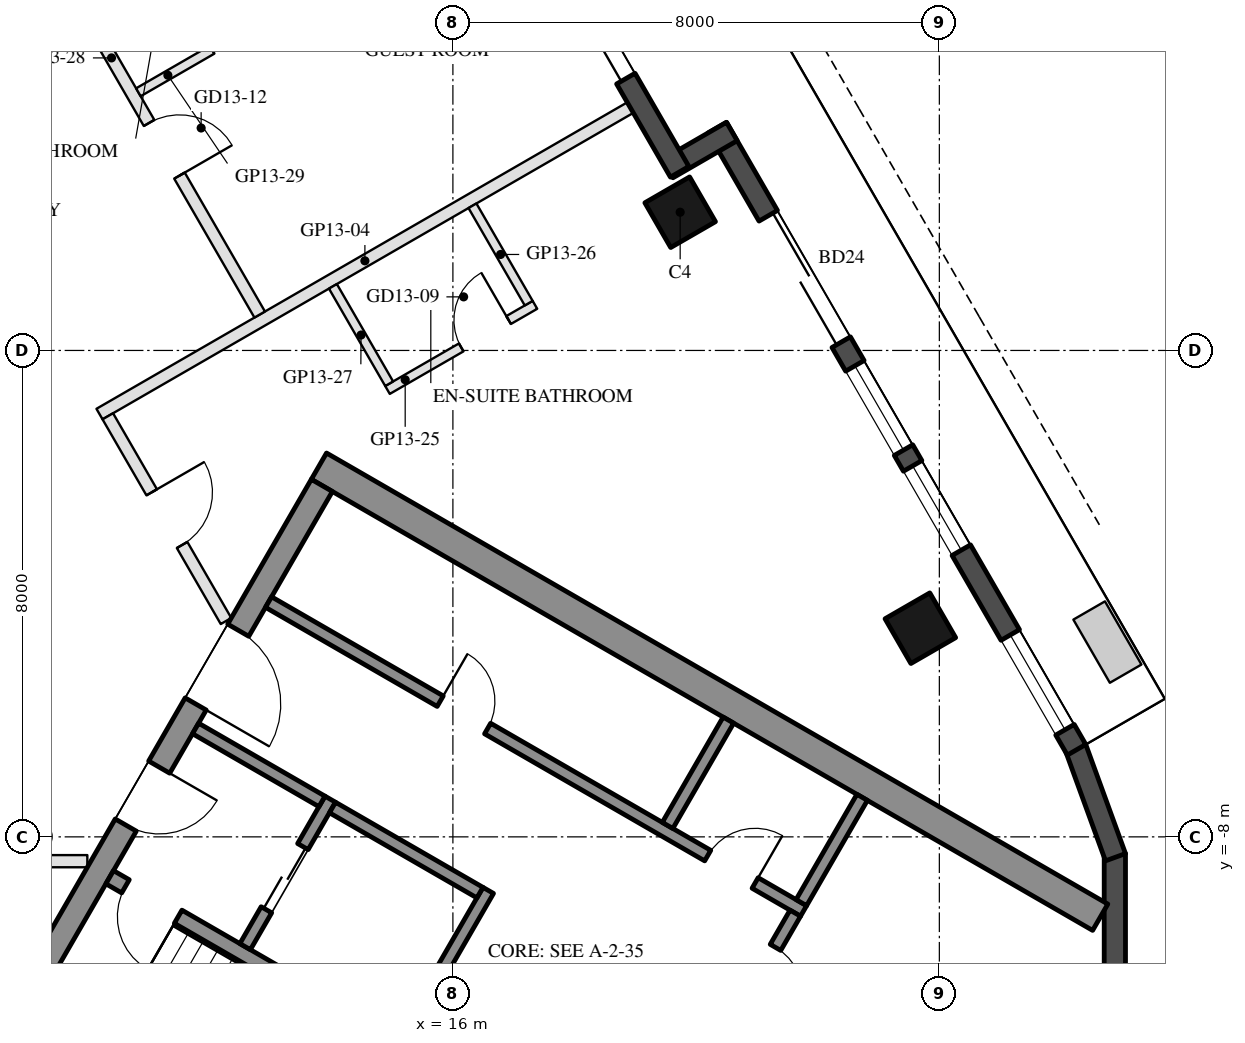
"""IFC4 building model, lengths in metres.
Left out: names, types, materials, properties, quantities, classifications, styles, units other than length and angle.
Written with IfcOpenShell. Run it as: python <this file> out.ifc"""

import sys

from ifc_helpers import new_model, si_unit, direction, frame, frame_2d, origin, origin_2d, place, context, subcontext, project, spatial, rectangle, hollow_rectangle, extrude, element, fill, save


model = new_model("IFC4")
c1 = context("Model", 3, precision=1e-05, world=origin(), true_north=direction((0.0, 1.0)))
c2 = subcontext(c1, "Body", "Model", "MODEL_VIEW")
j1 = project(units=[si_unit("LENGTHUNIT", "METRE"), si_unit("PLANEANGLEUNIT", "RADIAN")], contexts=[c1])
p1 = place(None, origin())
s1 = spatial("IfcSite", under=j1, at=p1, CompositionType="ELEMENT")
p2 = place(p1, origin())
s2 = spatial("IfcBuilding", under=s1, at=p2, CompositionType="ELEMENT")
p3 = place(p2, frame((0.0, 0.0, 154.0)))
s3 = spatial("IfcBuildingStorey", under=s2, at=p3, CompositionType="ELEMENT", Elevation=154.0)
for number, where, z_axis, x_axis in (
    (1, (23.688, -4.568, 0.0), (0.0, 0.0, 1.0), (-0.5, 0.866, 0.0)),
    (2, (19.738, 2.273, 0.0), (0.0, 0.0, 1.0), (-0.5, 0.866, 0.0)),
):
    element("IfcColumn", number, at=place(p3, frame(where, z_axis=z_axis, x_axis=x_axis)), inside=s3, PredefinedType="COLUMN", context=c2, shape_type="SweptSolid", body=[
        extrude(hollow_rectangle(XDim=0.85, YDim=0.85, WallThickness=0.04, at=origin_2d()), origin(), (0.0, 0.0, 1.0), 3.7),
    ])
for number, where, z_axis, x_axis in (
    (3, (26.244, -11.92, 0.0), (0.0, 0.0, 1.0), (0.342, 0.94, 0.0)),
    (4, (26.886, -10.185, 0.0), (0.0, 0.0, 1.0), (0.0, 1.0, 0.0)),
    (5, (26.897, -8.335, 0.0), (0.0, 0.0, 1.0), (-0.342, 0.94, 0.0)),
):
    element("IfcWall", number, at=place(p3, frame(where, z_axis=z_axis, x_axis=x_axis)), inside=s3, PredefinedType="SOLIDWALL", context=c2, shape_type="SweptSolid", body=[
        extrude(rectangle(XDim=1.91, YDim=0.35, at=frame_2d((0.955, 0.0))), origin(), (0.0, 0.0, 1.0), 3.55),
    ])
p4 = place(p3, frame((26.257, -6.567, 0.0), z_axis=(0.0, 0.0, 1.0), x_axis=(-0.500023526245, 0.866011820475, 0.0)))
e6 = element("IfcWall", 6, at=p4, inside=s3, PredefinedType="SOLIDWALL", context=c2, shape_type="SweptSolid", body=[
    extrude(rectangle(XDim=11.816, YDim=0.35, at=frame_2d((5.908, 0.0))), origin(), (0.0, 0.0, 1.0), 3.55),
])
p5 = place(p4, frame((0.38, 0.0, 0.3)))
e7 = element("IfcOpeningElement", 7, at=p5, cuts=e6, PredefinedType="OPENING", context=c2, shape_type="SweptSolid", body=[
    extrude(rectangle(XDim=1.8, YDim=2.65, at=frame_2d((0.9, 1.325))), frame((0.0, 0.185, 0.0), z_axis=(0.0, -1.0, 0.0), x_axis=(1.0, 0.0, 0.0)), (0.0, 0.0, 1.0), 0.37),
])
p6 = place(p4, frame((7.741, 0.0, 0.0)))
e8 = element("IfcOpeningElement", 8, at=p6, cuts=e6, PredefinedType="OPENING", context=c2, shape_type="SweptSolid", body=[
    extrude(rectangle(XDim=2.4, YDim=2.4, at=frame_2d((1.2, 1.2))), frame((0.0, 0.185, 0.0), z_axis=(0.0, -1.0, 0.0), x_axis=(1.0, 0.0, 0.0)), (0.0, 0.0, 1.0), 0.37),
])
p7 = place(p4, frame((3.791, 0.0, 0.3)))
e9 = element("IfcOpeningElement", 9, at=p7, cuts=e6, PredefinedType="OPENING", context=c2, shape_type="SweptSolid", body=[
    extrude(rectangle(XDim=1.6, YDim=2.65, at=frame_2d((0.8, 1.325))), frame((0.0, 0.185, 0.0), z_axis=(0.0, -1.0, 0.0), x_axis=(1.0, 0.0, 0.0)), (0.0, 0.0, 1.0), 0.37),
])
p8 = place(p4, frame((5.691, 0.0, 0.3)))
e10 = element("IfcOpeningElement", 10, at=p8, cuts=e6, PredefinedType="OPENING", context=c2, shape_type="SweptSolid", body=[
    extrude(rectangle(XDim=1.6, YDim=2.65, at=frame_2d((0.8, 1.325))), frame((0.0, 0.185, 0.0), z_axis=(0.0, -1.0, 0.0), x_axis=(1.0, 0.0, 0.0)), (0.0, 0.0, 1.0), 0.37),
])
p9 = place(p3, frame((20.588, 3.601, 0.0), z_axis=(0.0, 0.0, 1.0), x_axis=(-0.866005645448, -0.500034220881, 0.0)))
e11 = element("IfcWall", 11, at=p9, inside=s3, PredefinedType="SOLIDWALL", context=c2, shape_type="SweptSolid", body=[
    extrude(rectangle(XDim=1.22, YDim=0.35, at=frame_2d((0.61, 0.0))), origin(), (0.0, 0.0, 1.0), 3.55),
])
p10 = place(p3, frame((19.729, 2.938, 0.0), z_axis=(0.0, 0.0, 1.0), x_axis=(-0.499976430342, 0.866039011305, 0.0)))
e12 = element("IfcWall", 12, at=p10, inside=s3, PredefinedType="SOLIDWALL", context=c2, shape_type="SweptSolid", body=[
    extrude(rectangle(XDim=6.74, YDim=0.35, at=frame_2d((3.37, 0.0))), origin(), (0.0, 0.0, 1.0), 3.55),
])
p11 = place(p10, frame((1.77, 0.0, 0.0)))
e13 = element("IfcOpeningElement", 13, at=p11, cuts=e12, PredefinedType="OPENING", context=c2, shape_type="SweptSolid", body=[
    extrude(rectangle(XDim=2.4, YDim=2.4, at=frame_2d((1.2, 1.2))), frame((0.0, 0.185, 0.0), z_axis=(0.0, -1.0, 0.0), x_axis=(1.0, 0.0, 0.0)), (0.0, 0.0, 1.0), 0.37),
])
p12 = place(p10, frame((4.47, 0.0, 0.3)))
e14 = element("IfcOpeningElement", 14, at=p12, cuts=e12, PredefinedType="OPENING", context=c2, shape_type="SweptSolid", body=[
    extrude(rectangle(XDim=1.5, YDim=2.65, at=frame_2d((0.75, 1.325))), frame((0.0, 0.185, 0.0), z_axis=(0.0, -1.0, 0.0), x_axis=(1.0, 0.0, 0.0)), (0.0, 0.0, 1.0), 0.37),
])
p13 = place(p3, frame((13.797, -1.903, 0.0), z_axis=(0.0, 0.0, 1.0), x_axis=(0.866025009528, -0.500000682871, 0.0)))
e15 = element("IfcWall", 15, at=p13, inside=s3, PredefinedType="SHEAR", context=c2, shape_type="SweptSolid", body=[
    extrude(rectangle(XDim=14.837, YDim=0.5, at=frame_2d((7.418, 0.0))), origin(), (0.0, 0.0, 1.0), 3.5),
])
p14 = place(p3, frame((8.845, -10.88, 0.0), z_axis=(0.0, 0.0, 1.0), x_axis=(0.500004234368, 0.866022959057, 0.0)))
e16 = element("IfcWall", 16, at=p14, inside=s3, PredefinedType="SHEAR", context=c2, shape_type="SweptSolid", body=[
    extrude(rectangle(XDim=10.0, YDim=0.4, at=frame_2d((5.0, 0.0))), origin(), (0.0, 0.0, 1.0), 3.5),
])
p15 = place(p14, frame((3.55, 0.0, 0.0)))
e17 = element("IfcOpeningElement", 17, at=p15, cuts=e16, PredefinedType="OPENING", context=c2, shape_type="SweptSolid", body=[
    extrude(rectangle(XDim=1.1, YDim=2.1, at=frame_2d((0.55, 1.05))), frame((0.0, 0.21, 0.0), z_axis=(0.0, -1.0, 0.0), x_axis=(1.0, 0.0, 0.0)), (0.0, 0.0, 1.0), 0.42),
])
p16 = place(p14, frame((5.85, 0.0, 0.0)))
e18 = element("IfcOpeningElement", 18, at=p16, cuts=e16, PredefinedType="OPENING", context=c2, shape_type="SweptSolid", body=[
    extrude(rectangle(XDim=1.4, YDim=2.1, at=frame_2d((0.7, 1.05))), frame((0.0, 0.21, 0.0), z_axis=(0.0, -1.0, 0.0), x_axis=(1.0, 0.0, 0.0)), (0.0, 0.0, 1.0), 0.42),
])
p17 = place(p3, frame((10.356, -8.664, 0.0), z_axis=(0.0, 0.0, 1.0), x_axis=(0.866028629588, -0.499994412703, 0.0)))
e19 = element("IfcWall", 19, at=p17, inside=s3, PredefinedType="SHEAR", context=c2, shape_type="SweptSolid", body=[
    extrude(rectangle(XDim=6.45, YDim=0.25, at=frame_2d((3.225, 0.0))), origin(), (0.0, 0.0, 1.0), 3.5),
])
p18 = place(p17, frame((0.3, 0.0, 0.0)))
e20 = element("IfcOpeningElement", 20, at=p18, cuts=e19, PredefinedType="OPENING", context=c2, shape_type="SweptSolid", body=[
    extrude(rectangle(XDim=1.0, YDim=2.1, at=frame_2d((0.5, 1.05))), frame((0.0, 0.135, 0.0), z_axis=(0.0, -1.0, 0.0), x_axis=(1.0, 0.0, 0.0)), (0.0, 0.0, 1.0), 0.27),
])
p19 = place(p3, frame((15.181, -11.305, 0.0), z_axis=(0.0, 0.0, 1.0), x_axis=(0.49994636267, 0.866056369097, 0.0)))
e21 = element("IfcWall", 21, at=p19, inside=s3, PredefinedType="SHEAR", context=c2, shape_type="SweptSolid", body=[
    extrude(rectangle(XDim=2.8, YDim=0.2, at=frame_2d((1.4, 0.0))), origin(), (0.0, 0.0, 1.0), 3.5),
])
p20 = place(p3, frame((12.583, -9.805, 0.0), z_axis=(0.0, 0.0, 1.0), x_axis=(0.49994636267, 0.866056369097, 0.0)))
e22 = element("IfcWall", 22, at=p20, inside=s3, PredefinedType="SHEAR", context=c2, shape_type="SweptSolid", body=[
    extrude(rectangle(XDim=2.8, YDim=0.2, at=frame_2d((1.4, 0.0))), origin(), (0.0, 0.0, 1.0), 3.5),
])
p21 = place(p20, frame((0.7, 0.0, 0.0)))
e23 = element("IfcOpeningElement", 23, at=p21, cuts=e22, PredefinedType="OPENING", context=c2, shape_type="SweptSolid", body=[
    extrude(rectangle(XDim=1.2, YDim=2.1, at=frame_2d((0.6, 1.05))), frame((0.0, 0.11, 0.0), z_axis=(0.0, -1.0, 0.0), x_axis=(1.0, 0.0, 0.0)), (0.0, 0.0, 1.0), 0.22),
])
p22 = place(p3, frame((11.768, -6.217, 0.0), z_axis=(0.0, 0.0, 1.0), x_axis=(0.866050077142, -0.499957262057, 0.0)))
e24 = element("IfcWall", 24, at=p22, inside=s3, PredefinedType="SHEAR", context=c2, shape_type="SweptSolid", body=[
    extrude(rectangle(XDim=2.4, YDim=0.2, at=frame_2d((1.2, 0.0))), origin(), (0.0, 0.0, 1.0), 3.5),
])
p23 = place(p3, frame((14.02, -7.517, 0.0), z_axis=(0.0, 0.0, 1.0), x_axis=(0.866034573852, -0.49998411664, 0.0)))
e25 = element("IfcWall", 25, at=p23, inside=s3, PredefinedType="SHEAR", context=c2, shape_type="SweptSolid", body=[
    extrude(rectangle(XDim=2.8, YDim=0.2, at=frame_2d((1.4, 0.0))), origin(), (0.0, 0.0, 1.0), 3.5),
])
p24 = place(p3, frame((12.968, -4.138, 0.0), z_axis=(0.0, 0.0, 1.0), x_axis=(0.866028328073, -0.49999493495, 0.0)))
e26 = element("IfcWall", 26, at=p24, inside=s3, PredefinedType="SHEAR", context=c2, shape_type="SweptSolid", body=[
    extrude(rectangle(XDim=10.16, YDim=0.2, at=frame_2d((5.08, 0.0))), origin(), (0.0, 0.0, 1.0), 3.5),
])
p25 = place(p24, frame((3.26, 0.0, 0.0)))
e27 = element("IfcOpeningElement", 27, at=p25, cuts=e26, PredefinedType="OPENING", context=c2, shape_type="SweptSolid", body=[
    extrude(rectangle(XDim=0.9, YDim=2.1, at=frame_2d((0.45, 1.05))), frame((0.0, 0.11, 0.0), z_axis=(0.0, -1.0, 0.0), x_axis=(1.0, 0.0, 0.0)), (0.0, 0.0, 1.0), 0.22),
])
p26 = place(p24, frame((8.34, 0.0, 0.0)))
e28 = element("IfcOpeningElement", 28, at=p26, cuts=e26, PredefinedType="OPENING", context=c2, shape_type="SweptSolid", body=[
    extrude(rectangle(XDim=0.9, YDim=2.1, at=frame_2d((0.45, 1.05))), frame((0.0, 0.11, 0.0), z_axis=(0.0, -1.0, 0.0), x_axis=(1.0, 0.0, 0.0)), (0.0, 0.0, 1.0), 0.22),
])
p27 = place(p3, frame((20.43, -11.333, 0.0), z_axis=(0.0, 0.0, 1.0), x_axis=(0.500001309137, 0.866024647952, 0.0)))
e29 = element("IfcWall", 29, at=p27, inside=s3, PredefinedType="SHEAR", context=c2, shape_type="SweptSolid", body=[
    extrude(rectangle(XDim=2.4, YDim=0.2, at=frame_2d((1.2, 0.0))), origin(), (0.0, 0.0, 1.0), 3.5),
])
p28 = place(p27, frame((0.85, 0.0, 0.0)))
e30 = element("IfcOpeningElement", 30, at=p28, cuts=e29, PredefinedType="OPENING", context=c2, shape_type="SweptSolid", body=[
    extrude(rectangle(XDim=0.9, YDim=2.1, at=frame_2d((0.45, 1.05))), frame((0.0, 0.11, 0.0), z_axis=(0.0, -1.0, 0.0), x_axis=(1.0, 0.0, 0.0)), (0.0, 0.0, 1.0), 0.22),
])
for number, where, z_axis, x_axis in (
    (31, (19.531, -7.812, 0.0), (0.0, 0.0, 1.0), (0.5, 0.866, 0.0)),
    (32, (21.73, -9.082, 0.0), (0.0, 0.0, 1.0), (0.5, 0.866, 0.0)),
):
    element("IfcWall", number, at=place(p3, frame(where, z_axis=z_axis, x_axis=x_axis)), inside=s3, PredefinedType="SHEAR", context=c2, shape_type="SweptSolid", body=[
        extrude(rectangle(XDim=2.0, YDim=0.2, at=frame_2d((1.0, 0.0))), origin(), (0.0, 0.0, 1.0), 3.5),
    ])
p29 = place(p3, frame((18.917, 3.994, 0.0), z_axis=(0.0, 0.0, 1.0), x_axis=(-0.866022637375, -0.500004791531, 0.0)))
e33 = element("IfcWall", 33, at=p29, inside=s3, PredefinedType="PARTITIONING", context=c2, shape_type="SweptSolid", body=[
    extrude(rectangle(XDim=10.08, YDim=0.2, at=frame_2d((5.04, 0.0))), origin(), (0.0, 0.0, 1.0), 3.06),
])
p30 = place(p3, frame((9.988, -8.4, 0.0), z_axis=(0.0, 0.0, 1.0), x_axis=(-1.0, 0.0, 0.0)))
e34 = element("IfcWall", 34, at=p30, inside=s3, PredefinedType="PARTITIONING", context=c2, shape_type="SweptSolid", body=[
    extrude(rectangle(XDim=5.686, YDim=0.2, at=frame_2d((2.843, 0.0))), origin(), (0.0, 0.0, 1.0), 2.95),
])
p31 = place(p30, frame((2.343, 0.0, 0.0)))
e35 = element("IfcOpeningElement", 35, at=p31, cuts=e34, PredefinedType="OPENING", context=c2, shape_type="SweptSolid", body=[
    extrude(rectangle(XDim=1.0, YDim=2.1, at=frame_2d((0.5, 1.05))), frame((0.0, 0.11, 0.0), z_axis=(0.0, -1.0, 0.0), x_axis=(1.0, 0.0, 0.0)), (0.0, 0.0, 1.0), 0.22),
])
p32 = place(p3, frame((10.325, -1.083, 0.0), z_axis=(0.0, 0.0, 1.0), x_axis=(0.500008716408, -0.866020371305, 0.0)))
e36 = element("IfcWall", 36, at=p32, inside=s3, PredefinedType="PARTITIONING", context=c2, shape_type="SweptSolid", body=[
    extrude(rectangle(XDim=3.888, YDim=0.2, at=frame_2d((1.944, 0.0))), origin(), (0.0, 0.0, 1.0), 2.95),
])
p33 = place(p32, frame((1.444, 0.0, 0.0)))
e37 = element("IfcOpeningElement", 37, at=p33, cuts=e36, PredefinedType="OPENING", context=c2, shape_type="SweptSolid", body=[
    extrude(rectangle(XDim=1.0, YDim=2.1, at=frame_2d((0.5, 1.05))), frame((0.0, 0.11, 0.0), z_axis=(0.0, -1.0, 0.0), x_axis=(1.0, 0.0, 0.0)), (0.0, 0.0, 1.0), 0.22),
])
p34 = place(p3, frame((14.924, -0.65, 0.0), z_axis=(0.0, 0.0, 1.0), x_axis=(0.866056369097, 0.49994636267, 0.0)))
e38 = element("IfcWall", 38, at=p34, inside=s3, PredefinedType="PARTITIONING", context=c2, shape_type="SweptSolid", body=[
    extrude(rectangle(XDim=2.8, YDim=0.15, at=frame_2d((1.4, 0.0))), origin(), (0.0, 0.0, 1.0), 2.95),
])
p35 = place(p34, frame((1.4, 0.0, 0.0)))
e39 = element("IfcOpeningElement", 39, at=p35, cuts=e38, PredefinedType="OPENING", context=c2, shape_type="SweptSolid", body=[
    extrude(rectangle(XDim=0.9, YDim=2.1, at=frame_2d((0.45, 1.05))), frame((0.0, 0.085, 0.0), z_axis=(0.0, -1.0, 0.0), x_axis=(1.0, 0.0, 0.0)), (0.0, 0.0, 1.0), 0.17),
])
for number, where, z_axis, x_axis in (
    (40, (17.247, 0.778, 0.0), (0.0, 0.0, 1.0), (-0.5, 0.866, 0.0)),
    (41, (14.952, -0.547, 0.0), (0.0, 0.0, 1.0), (-0.5, 0.866, 0.0)),
):
    element("IfcWall", number, at=place(p3, frame(where, z_axis=z_axis, x_axis=x_axis)), inside=s3, PredefinedType="PARTITIONING", context=c2, shape_type="SweptSolid", body=[
        extrude(rectangle(XDim=1.85, YDim=0.15, at=frame_2d((0.925, 0.0))), origin(), (0.0, 0.0, 1.0), 2.95),
    ])
p36 = place(p3, frame((9.777, 5.867, 0.0), z_axis=(0.0, 0.0, 1.0), x_axis=(0.499996493545, -0.866027428228, 0.0)))
e42 = element("IfcWall", 42, at=p36, inside=s3, PredefinedType="PARTITIONING", context=c2, shape_type="SweptSolid", body=[
    extrude(rectangle(XDim=6.092, YDim=0.2, at=frame_2d((3.046, 0.0))), origin(), (0.0, 0.0, 1.0), 2.95),
])
p37 = place(p36, frame((2.454, 0.0, 0.0)))
e43 = element("IfcOpeningElement", 43, at=p37, cuts=e42, PredefinedType="OPENING", context=c2, shape_type="SweptSolid", body=[
    extrude(rectangle(XDim=1.0, YDim=2.1, at=frame_2d((0.5, 1.05))), frame((0.0, 0.11, 0.0), z_axis=(0.0, -1.0, 0.0), x_axis=(1.0, 0.0, 0.0)), (0.0, 0.0, 1.0), 0.22),
])
p38 = place(p3, frame((10.827, 4.246, 0.0), z_axis=(0.0, 0.0, 1.0), x_axis=(0.866018616679, 0.500011755427, 0.0)))
e44 = element("IfcWall", 44, at=p38, inside=s3, PredefinedType="PARTITIONING", context=c2, shape_type="SweptSolid", body=[
    extrude(rectangle(XDim=2.8, YDim=0.15, at=frame_2d((1.4, 0.0))), origin(), (0.0, 0.0, 1.0), 3.55),
])
p39 = place(p38, frame((1.4, 0.0, 0.0)))
e45 = element("IfcOpeningElement", 45, at=p39, cuts=e44, PredefinedType="OPENING", context=c2, shape_type="SweptSolid", body=[
    extrude(rectangle(XDim=0.9, YDim=2.1, at=frame_2d((0.45, 1.05))), frame((0.0, 0.085, 0.0), z_axis=(0.0, -1.0, 0.0), x_axis=(1.0, 0.0, 0.0)), (0.0, 0.0, 1.0), 0.17),
])
p40 = place(p5, origin())
e46 = element("IfcWindow", 46, at=p40, inside=s3, PartitioningType="SINGLE_PANEL", PredefinedType="WINDOW", context=c2, shape_type="SweptSolid", body=[
    extrude(rectangle(XDim=1.8, YDim=2.65, at=frame_2d((0.9, 1.325))), frame((0.0, 0.03, 0.0), z_axis=(0.0, -1.0, 0.0), x_axis=(1.0, 0.0, 0.0)), (0.0, 0.0, 1.0), 0.06),
])
fill(e7, e46)
p41 = place(p6, frame((2.4, 0.0, 0.0), z_axis=(0.0, 0.0, 1.0), x_axis=(-1.0, 0.0, 0.0)))
e47 = element("IfcDoor", 47, at=p41, inside=s3, OperationType="SLIDING_TO_LEFT", PredefinedType="DOOR", context=c2, shape_type="SweptSolid", body=[
    extrude(rectangle(XDim=2.4, YDim=2.4, at=frame_2d((1.2, 1.2))), frame((0.0, 0.025, 0.0), z_axis=(0.0, -1.0, 0.0), x_axis=(1.0, 0.0, 0.0)), (0.0, 0.0, 1.0), 0.05),
])
fill(e8, e47)
p42 = place(p7, origin())
e48 = element("IfcWindow", 48, at=p42, inside=s3, PartitioningType="SINGLE_PANEL", PredefinedType="WINDOW", context=c2, shape_type="SweptSolid", body=[
    extrude(rectangle(XDim=1.6, YDim=2.65, at=frame_2d((0.8, 1.325))), frame((0.0, 0.03, 0.0), z_axis=(0.0, -1.0, 0.0), x_axis=(1.0, 0.0, 0.0)), (0.0, 0.0, 1.0), 0.06),
])
fill(e9, e48)
p43 = place(p8, origin())
e49 = element("IfcWindow", 49, at=p43, inside=s3, PartitioningType="SINGLE_PANEL", PredefinedType="WINDOW", context=c2, shape_type="SweptSolid", body=[
    extrude(rectangle(XDim=1.6, YDim=2.65, at=frame_2d((0.8, 1.325))), frame((0.0, 0.03, 0.0), z_axis=(0.0, -1.0, 0.0), x_axis=(1.0, 0.0, 0.0)), (0.0, 0.0, 1.0), 0.06),
])
fill(e10, e49)
p44 = place(p11, frame((2.4, 0.0, 0.0), z_axis=(0.0, 0.0, 1.0), x_axis=(-1.0, 0.0, 0.0)))
e50 = element("IfcDoor", 50, at=p44, inside=s3, OperationType="SLIDING_TO_LEFT", PredefinedType="DOOR", context=c2, shape_type="SweptSolid", body=[
    extrude(rectangle(XDim=2.4, YDim=2.4, at=frame_2d((1.2, 1.2))), frame((0.0, 0.025, 0.0), z_axis=(0.0, -1.0, 0.0), x_axis=(1.0, 0.0, 0.0)), (0.0, 0.0, 1.0), 0.05),
])
fill(e13, e50)
p45 = place(p21, origin())
e51 = element("IfcDoor", 51, at=p45, inside=s3, OperationType="DOUBLE_DOOR_SLIDING", PredefinedType="DOOR", context=c2, shape_type="SweptSolid", body=[
    extrude(rectangle(XDim=1.2, YDim=2.1, at=frame_2d((0.6, 1.05))), frame((0.0, 0.025, 0.0), z_axis=(0.0, -1.0, 0.0), x_axis=(1.0, 0.0, 0.0)), (0.0, 0.0, 1.0), 0.05),
])
fill(e23, e51)
p46 = place(p25, origin())
e52 = element("IfcDoor", 52, at=p46, inside=s3, OperationType="SINGLE_SWING_LEFT", PredefinedType="DOOR", context=c2, shape_type="SweptSolid", body=[
    extrude(rectangle(XDim=0.9, YDim=2.1, at=frame_2d((0.45, 1.05))), frame((0.0, 0.025, 0.0), z_axis=(0.0, -1.0, 0.0), x_axis=(1.0, 0.0, 0.0)), (0.0, 0.0, 1.0), 0.05),
])
fill(e27, e52)
p47 = place(p26, origin())
e53 = element("IfcDoor", 53, at=p47, inside=s3, OperationType="SINGLE_SWING_RIGHT", PredefinedType="DOOR", context=c2, shape_type="SweptSolid", body=[
    extrude(rectangle(XDim=0.9, YDim=2.1, at=frame_2d((0.45, 1.05))), frame((0.0, 0.025, 0.0), z_axis=(0.0, -1.0, 0.0), x_axis=(1.0, 0.0, 0.0)), (0.0, 0.0, 1.0), 0.05),
])
fill(e28, e53)
p48 = place(p28, frame((0.9, 0.0, 0.0), z_axis=(0.0, 0.0, 1.0), x_axis=(-1.0, 0.0, 0.0)))
e54 = element("IfcDoor", 54, at=p48, inside=s3, OperationType="SINGLE_SWING_RIGHT", PredefinedType="DOOR", context=c2, shape_type="SweptSolid", body=[
    extrude(rectangle(XDim=0.9, YDim=2.1, at=frame_2d((0.45, 1.05))), frame((0.0, 0.025, 0.0), z_axis=(0.0, -1.0, 0.0), x_axis=(1.0, 0.0, 0.0)), (0.0, 0.0, 1.0), 0.05),
])
fill(e30, e54)
p49 = place(p15, frame((1.1, 0.0, 0.0), z_axis=(0.0, 0.0, 1.0), x_axis=(-1.0, 0.0, 0.0)))
e55 = element("IfcDoor", 55, at=p49, inside=s3, OperationType="SINGLE_SWING_LEFT", PredefinedType="DOOR", context=c2, shape_type="SweptSolid", body=[
    extrude(rectangle(XDim=1.1, YDim=2.1, at=frame_2d((0.55, 1.05))), frame((0.0, 0.025, 0.0), z_axis=(0.0, -1.0, 0.0), x_axis=(1.0, 0.0, 0.0)), (0.0, 0.0, 1.0), 0.05),
])
fill(e17, e55)
p50 = place(p16, frame((1.4, 0.0, 0.0), z_axis=(0.0, 0.0, 1.0), x_axis=(-1.0, 0.0, 0.0)))
e56 = element("IfcDoor", 56, at=p50, inside=s3, OperationType="DOUBLE_DOOR_SINGLE_SWING", PredefinedType="DOOR", context=c2, shape_type="SweptSolid", body=[
    extrude(rectangle(XDim=1.4, YDim=2.1, at=frame_2d((0.7, 1.05))), frame((0.0, 0.025, 0.0), z_axis=(0.0, -1.0, 0.0), x_axis=(1.0, 0.0, 0.0)), (0.0, 0.0, 1.0), 0.05),
])
fill(e18, e56)
p51 = place(p18, frame((1.0, 0.0, 0.0), z_axis=(0.0, 0.0, 1.0), x_axis=(-1.0, 0.0, 0.0)))
e57 = element("IfcDoor", 57, at=p51, inside=s3, OperationType="SINGLE_SWING_LEFT", PredefinedType="DOOR", context=c2, shape_type="SweptSolid", body=[
    extrude(rectangle(XDim=1.0, YDim=2.1, at=frame_2d((0.5, 1.05))), frame((0.0, 0.025, 0.0), z_axis=(0.0, -1.0, 0.0), x_axis=(1.0, 0.0, 0.0)), (0.0, 0.0, 1.0), 0.05),
])
fill(e20, e57)
p52 = place(p35, origin())
e58 = element("IfcDoor", 58, at=p52, inside=s3, OperationType="SINGLE_SWING_RIGHT", PredefinedType="DOOR", context=c2, shape_type="SweptSolid", body=[
    extrude(rectangle(XDim=0.9, YDim=2.1, at=frame_2d((0.45, 1.05))), frame((0.0, 0.025, 0.0), z_axis=(0.0, -1.0, 0.0), x_axis=(1.0, 0.0, 0.0)), (0.0, 0.0, 1.0), 0.05),
])
fill(e39, e58)
p53 = place(p33, origin())
e59 = element("IfcDoor", 59, at=p53, inside=s3, OperationType="SINGLE_SWING_LEFT", PredefinedType="DOOR", context=c2, shape_type="SweptSolid", body=[
    extrude(rectangle(XDim=1.0, YDim=2.1, at=frame_2d((0.5, 1.05))), frame((0.0, 0.025, 0.0), z_axis=(0.0, -1.0, 0.0), x_axis=(1.0, 0.0, 0.0)), (0.0, 0.0, 1.0), 0.05),
])
fill(e37, e59)
p54 = place(p37, origin())
e60 = element("IfcDoor", 60, at=p54, inside=s3, OperationType="SINGLE_SWING_RIGHT", PredefinedType="DOOR", context=c2, shape_type="SweptSolid", body=[
    extrude(rectangle(XDim=1.0, YDim=2.1, at=frame_2d((0.5, 1.05))), frame((0.0, 0.025, 0.0), z_axis=(0.0, -1.0, 0.0), x_axis=(1.0, 0.0, 0.0)), (0.0, 0.0, 1.0), 0.05),
])
fill(e43, e60)
save(model, sys.argv[1])
